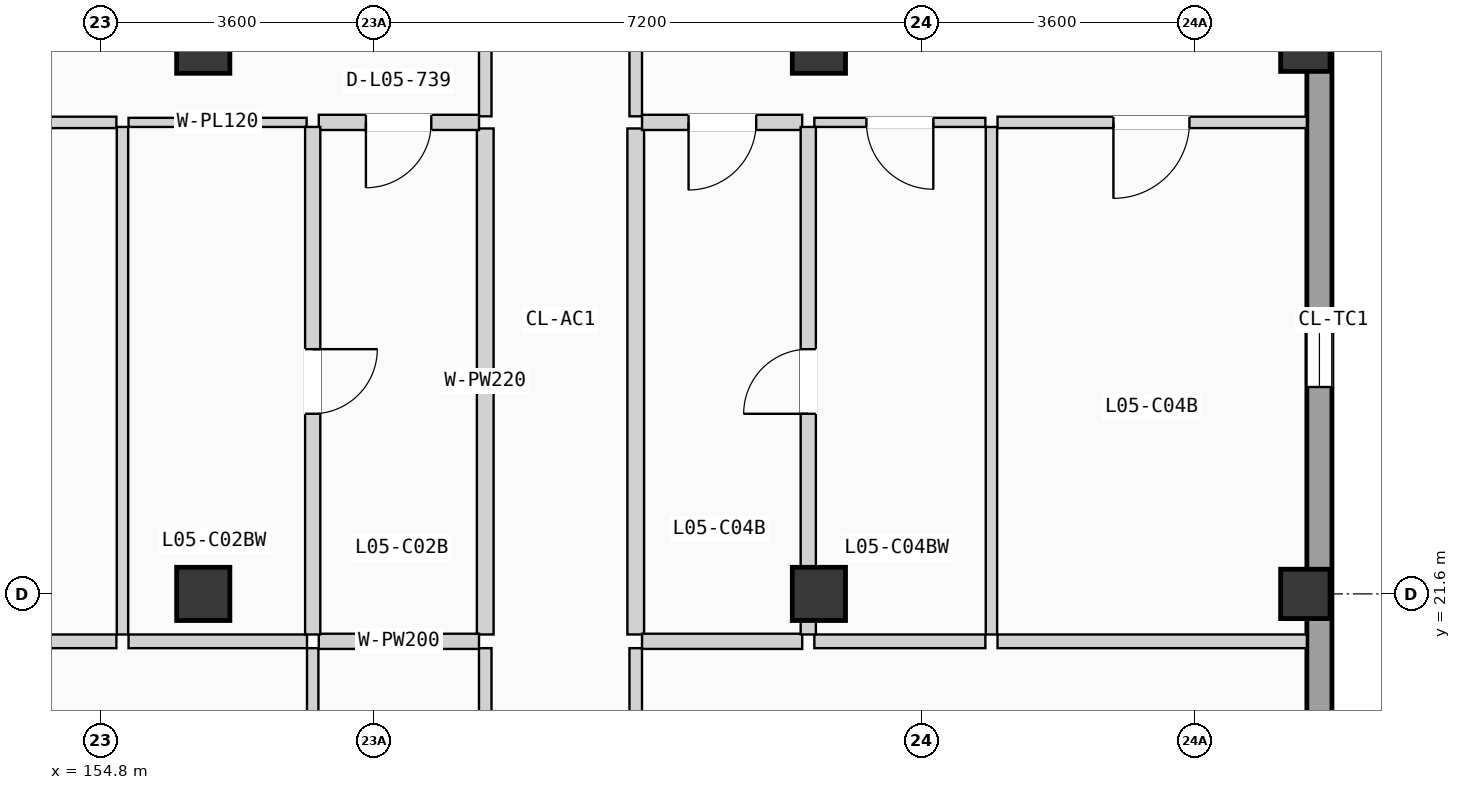
"""IFC4 building model, lengths in metres.
Left out: names, types, materials, properties, quantities, classifications, styles, units other than length and angle.
Written with IfcOpenShell. Run it as: python <this file> out.ifc"""

import sys

from ifc_helpers import new_model, si_unit, direction, frame, frame_2d, origin, origin_2d, place, context, subcontext, project, spatial, rectangle, extrude, element, fill, save


model = new_model("IFC4")
c1 = context("Model", 3, precision=1e-05, world=origin(), true_north=direction((0.0, 1.0)))
c2 = subcontext(c1, "Body", "Model", "MODEL_VIEW")
j1 = project(units=[si_unit("LENGTHUNIT", "METRE"), si_unit("PLANEANGLEUNIT", "RADIAN")], contexts=[c1])
p1 = place(None, origin())
s1 = spatial("IfcSite", under=j1, at=p1, CompositionType="ELEMENT")
p2 = place(p1, origin())
s2 = spatial("IfcBuilding", under=s1, at=p2, CompositionType="ELEMENT")
p3 = place(p2, frame((0.0, 0.0, 18.375)))
s3 = spatial("IfcBuildingStorey", under=s2, at=p3, CompositionType="ELEMENT", Elevation=18.375)
for number, where, z_axis, x_axis in (
    (1, (156.15, 21.6, 0.0), (0.0, 0.0, 1.0), (1.0, 0.0, 0.0)),
    (2, (156.15, 28.8, 0.0), (0.0, 0.0, 1.0), (1.0, 0.0, 0.0)),
    (3, (164.25, 21.6, 0.0), (0.0, 0.0, 1.0), (1.0, 0.0, 0.0)),
    (4, (164.25, 28.8, 0.0), (0.0, 0.0, 1.0), (1.0, 0.0, 0.0)),
):
    element("IfcColumn", number, at=place(p3, frame(where, z_axis=z_axis, x_axis=x_axis)), inside=s3, PredefinedType="COLUMN", context=c2, shape_type="SweptSolid", body=[
        extrude(rectangle(XDim=0.7, YDim=0.7, at=origin_2d()), origin(), (0.0, 0.0, 1.0), 3.15),
    ])
for number, where, z_axis, x_axis in (
    (5, (170.65, 21.6, 0.0), (0.0, 0.0, 1.0), (1.0, 0.0, 0.0)),
    (6, (170.65, 28.8, 0.0), (0.0, 0.0, 1.0), (1.0, 0.0, 0.0)),
):
    element("IfcColumn", number, at=place(p3, frame(where, z_axis=z_axis, x_axis=x_axis)), inside=s3, PredefinedType="COLUMN", context=c2, shape_type="SweptSolid", body=[
        extrude(rectangle(XDim=0.65, YDim=0.65, at=origin_2d()), origin(), (0.0, 0.0, 1.0), 3.15),
    ])
p4 = place(p3, frame((170.835, 0.33, 0.0), z_axis=(0.0, 0.0, 1.0), x_axis=(0.0, 1.0, 0.0)))
e7 = element("IfcWall", 7, at=p4, inside=s3, PredefinedType="SOLIDWALL", context=c2, shape_type="SweptSolid", body=[
    extrude(rectangle(XDim=49.74, YDim=0.33, at=frame_2d((24.87, 0.0))), origin(), (0.0, 0.0, 1.0), 2.89),
])
p5 = place(p4, frame((9.91, 0.0, 0.855)))
e8 = element("IfcOpeningElement", 8, at=p5, cuts=e7, PredefinedType="OPENING", context=c2, shape_type="SweptSolid", body=[
    extrude(rectangle(XDim=1.25, YDim=1.35, at=frame_2d((0.625, 0.675))), frame((0.0, 0.175, 0.0), z_axis=(0.0, -1.0, 0.0), x_axis=(1.0, 0.0, 0.0)), (0.0, 0.0, 1.0), 0.35),
])
p6 = place(p4, frame((16.823, 0.0, 0.705)))
e9 = element("IfcOpeningElement", 9, at=p6, cuts=e7, PredefinedType="OPENING", context=c2, shape_type="SweptSolid", body=[
    extrude(rectangle(XDim=1.25, YDim=1.5, at=frame_2d((0.625, 0.75))), frame((0.0, 0.175, 0.0), z_axis=(0.0, -1.0, 0.0), x_axis=(1.0, 0.0, 0.0)), (0.0, 0.0, 1.0), 0.35),
])
p7 = place(p4, frame((31.065, 0.0, 0.555)))
e10 = element("IfcOpeningElement", 10, at=p7, cuts=e7, PredefinedType="OPENING", context=c2, shape_type="SweptSolid", body=[
    extrude(rectangle(XDim=1.25, YDim=1.65, at=frame_2d((0.625, 0.825))), frame((0.0, 0.175, 0.0), z_axis=(0.0, -1.0, 0.0), x_axis=(1.0, 0.0, 0.0)), (0.0, 0.0, 1.0), 0.35),
])
p8 = place(p4, frame((23.992, 0.0, 0.85)))
e11 = element("IfcOpeningElement", 11, at=p8, cuts=e7, PredefinedType="OPENING", context=c2, shape_type="SweptSolid", body=[
    extrude(rectangle(XDim=0.95, YDim=1.2, at=frame_2d((0.475, 0.6))), frame((0.0, 0.175, 0.0), z_axis=(0.0, -1.0, 0.0), x_axis=(1.0, 0.0, 0.0)), (0.0, 0.0, 1.0), 0.35),
])
p9 = place(p4, frame((38.53, 0.0, 0.9)))
e12 = element("IfcOpeningElement", 12, at=p9, cuts=e7, PredefinedType="OPENING", context=c2, shape_type="SweptSolid", body=[
    extrude(rectangle(XDim=1.35, YDim=1.2, at=frame_2d((0.675, 0.6))), frame((0.0, 0.175, 0.0), z_axis=(0.0, -1.0, 0.0), x_axis=(1.0, 0.0, 0.0)), (0.0, 0.0, 1.0), 0.35),
])
p10 = place(p3, frame((159.86, 16.847, 0.0), z_axis=(0.0, 0.0, 1.0), x_axis=(0.0, 1.0, 0.0)))
e13 = element("IfcWall", 13, at=p10, inside=s3, PredefinedType="PARTITIONING", context=c2, shape_type="SweptSolid", body=[
    extrude(rectangle(XDim=4.039, YDim=0.165, at=frame_2d((2.02, 0.0))), origin(), (0.0, 0.0, 1.0), 2.87),
])
p11 = place(p3, frame((159.86, 27.884, 0.0), z_axis=(0.0, 0.0, 1.0), x_axis=(0.0, 1.0, 0.0)))
e14 = element("IfcWall", 14, at=p11, inside=s3, PredefinedType="PARTITIONING", context=c2, shape_type="SweptSolid", body=[
    extrude(rectangle(XDim=7.086, YDim=0.165, at=frame_2d((3.543, 0.0))), origin(), (0.0, 0.0, 1.0), 2.87),
])
p12 = place(p11, frame((3.038, 0.0, 0.0)))
e15 = element("IfcOpeningElement", 15, at=p12, cuts=e14, PredefinedType="OPENING", context=c2, shape_type="SweptSolid", body=[
    extrude(rectangle(XDim=1.01, YDim=2.11, at=frame_2d((0.505, 1.055))), frame((0.0, 0.093, 0.0), z_axis=(0.0, -1.0, 0.0), x_axis=(1.0, 0.0, 0.0)), (0.0, 0.0, 1.0), 0.185),
])
p13 = place(p3, frame((159.86, 21.066, 0.0), z_axis=(0.0, 0.0, 1.0), x_axis=(0.0, 1.0, 0.0)))
e16 = element("IfcWall", 16, at=p13, inside=s3, PredefinedType="PLUMBINGWALL", context=c2, shape_type="SweptSolid", body=[
    extrude(rectangle(XDim=6.658, YDim=0.22, at=frame_2d((3.329, 0.0))), origin(), (0.0, 0.0, 1.0), 2.87),
])
p14 = place(p3, frame((161.84, 14.333, 0.0), z_axis=(0.0, 0.0, 1.0), x_axis=(0.0, 1.0, 0.0)))
e17 = element("IfcWall", 17, at=p14, inside=s3, PredefinedType="PARTITIONING", context=c2, shape_type="SweptSolid", body=[
    extrude(rectangle(XDim=6.553, YDim=0.165, at=frame_2d((3.276, 0.0))), origin(), (0.0, 0.0, 1.0), 2.87),
])
p15 = place(p14, frame((2.787, 0.0, 0.0)))
e18 = element("IfcOpeningElement", 18, at=p15, cuts=e17, PredefinedType="OPENING", context=c2, shape_type="SweptSolid", body=[
    extrude(rectangle(XDim=0.98, YDim=2.08, at=frame_2d((0.49, 1.04))), frame((0.0, 0.093, 0.0), z_axis=(0.0, -1.0, 0.0), x_axis=(1.0, 0.0, 0.0)), (0.0, 0.0, 1.0), 0.185),
])
p16 = place(p3, frame((161.84, 27.884, 0.0), z_axis=(0.0, 0.0, 1.0), x_axis=(0.0, 1.0, 0.0)))
e19 = element("IfcWall", 19, at=p16, inside=s3, PredefinedType="PARTITIONING", context=c2, shape_type="SweptSolid", body=[
    extrude(rectangle(XDim=7.086, YDim=0.165, at=frame_2d((3.543, 0.0))), origin(), (0.0, 0.0, 1.0), 2.87),
])
p17 = place(p16, frame((3.038, 0.0, 0.0)))
e20 = element("IfcOpeningElement", 20, at=p17, cuts=e19, PredefinedType="OPENING", context=c2, shape_type="SweptSolid", body=[
    extrude(rectangle(XDim=1.01, YDim=2.11, at=frame_2d((0.505, 1.055))), frame((0.0, 0.093, 0.0), z_axis=(0.0, -1.0, 0.0), x_axis=(1.0, 0.0, 0.0)), (0.0, 0.0, 1.0), 0.185),
])
p18 = place(p3, frame((161.84, 21.066, 0.0), z_axis=(0.0, 0.0, 1.0), x_axis=(0.0, 1.0, 0.0)))
e21 = element("IfcWall", 21, at=p18, inside=s3, PredefinedType="PLUMBINGWALL", context=c2, shape_type="SweptSolid", body=[
    extrude(rectangle(XDim=6.658, YDim=0.22, at=frame_2d((3.329, 0.0))), origin(), (0.0, 0.0, 1.0), 2.87),
])
p19 = place(p3, frame((157.59, 16.842, 0.0), z_axis=(0.0, 0.0, 1.0), x_axis=(0.0, 1.0, 0.0)))
e22 = element("IfcWall", 22, at=p19, inside=s3, PredefinedType="PARTITIONING", context=c2, shape_type="SweptSolid", body=[
    extrude(rectangle(XDim=4.044, YDim=0.15, at=frame_2d((2.022, 0.0))), origin(), (0.0, 0.0, 1.0), 2.87),
])
p20 = place(p3, frame((157.67, 20.976, 0.0), z_axis=(0.0, 0.0, 1.0), x_axis=(1.0, 0.0, 0.0)))
e23 = element("IfcWall", 23, at=p20, inside=s3, PredefinedType="PLUMBINGWALL", context=c2, shape_type="SweptSolid", body=[
    extrude(rectangle(XDim=2.108, YDim=0.2, at=frame_2d((1.054, 0.0))), origin(), (0.0, 0.0, 1.0), 2.87),
])
p21 = place(p3, frame((149.73, 20.976, 0.0), z_axis=(0.0, 0.0, 1.0), x_axis=(1.0, 0.0, 0.0)))
e24 = element("IfcWall", 24, at=p21, inside=s3, PredefinedType="PARTITIONING", context=c2, shape_type="SweptSolid", body=[
    extrude(rectangle(XDim=5.277, YDim=0.18, at=frame_2d((2.639, 0.0))), origin(), (0.0, 0.0, 1.0), 2.87),
])
p22 = place(p3, frame((155.167, 20.976, 0.0), z_axis=(0.0, 0.0, 1.0), x_axis=(1.0, 0.0, 0.0)))
e25 = element("IfcWall", 25, at=p22, inside=s3, PredefinedType="PARTITIONING", context=c2, shape_type="SweptSolid", body=[
    extrude(rectangle(XDim=2.348, YDim=0.18, at=frame_2d((1.174, 0.0))), origin(), (0.0, 0.0, 1.0), 2.87),
])
p23 = place(p3, frame((157.67, 27.804, 0.0), z_axis=(0.0, 0.0, 1.0), x_axis=(1.0, 0.0, 0.0)))
e26 = element("IfcWall", 26, at=p23, inside=s3, PredefinedType="PLUMBINGWALL", context=c2, shape_type="SweptSolid", body=[
    extrude(rectangle(XDim=2.108, YDim=0.2, at=frame_2d((1.054, 0.0))), origin(), (0.0, 0.0, 1.0), 2.87),
])
p24 = place(p23, frame((0.62, 0.0, 0.0)))
e27 = element("IfcOpeningElement", 27, at=p24, cuts=e26, PredefinedType="OPENING", context=c2, shape_type="SweptSolid", body=[
    extrude(rectangle(XDim=0.86, YDim=2.0, at=frame_2d((0.43, 1.0))), frame((0.0, 0.11, 0.0), z_axis=(0.0, -1.0, 0.0), x_axis=(1.0, 0.0, 0.0)), (0.0, 0.0, 1.0), 0.22),
])
p25 = place(p3, frame((149.73, 27.804, 0.0), z_axis=(0.0, 0.0, 1.0), x_axis=(1.0, 0.0, 0.0)))
e28 = element("IfcWall", 28, at=p25, inside=s3, PredefinedType="PARTITIONING", context=c2, shape_type="SweptSolid", body=[
    extrude(rectangle(XDim=5.277, YDim=0.15, at=frame_2d((2.639, 0.0))), origin(), (0.0, 0.0, 1.0), 2.87),
])
p26 = place(p25, frame((2.109, 0.0, 0.0)))
e29 = element("IfcOpeningElement", 29, at=p26, cuts=e28, PredefinedType="OPENING", context=c2, shape_type="SweptSolid", body=[
    extrude(rectangle(XDim=1.08, YDim=2.1, at=frame_2d((0.54, 1.05))), frame((0.0, 0.085, 0.0), z_axis=(0.0, -1.0, 0.0), x_axis=(1.0, 0.0, 0.0)), (0.0, 0.0, 1.0), 0.17),
])
p27 = place(p3, frame((155.167, 27.804, 0.0), z_axis=(0.0, 0.0, 1.0), x_axis=(1.0, 0.0, 0.0)))
e30 = element("IfcWall", 30, at=p27, inside=s3, PredefinedType="PARTITIONING", context=c2, shape_type="SweptSolid", body=[
    extrude(rectangle(XDim=2.343, YDim=0.12, at=frame_2d((1.171, 0.0))), origin(), (0.0, 0.0, 1.0), 2.87),
])
p28 = place(p3, frame((157.59, 21.066, 0.0), z_axis=(0.0, 0.0, 1.0), x_axis=(0.0, 1.0, 0.0)))
e31 = element("IfcWall", 31, at=p28, inside=s3, PredefinedType="PLUMBINGWALL", context=c2, shape_type="SweptSolid", body=[
    extrude(rectangle(XDim=6.678, YDim=0.2, at=frame_2d((3.339, 0.0))), origin(), (0.0, 0.0, 1.0), 2.87),
])
p29 = place(p28, frame((2.904, 0.0, 0.0)))
e32 = element("IfcOpeningElement", 32, at=p29, cuts=e31, PredefinedType="OPENING", context=c2, shape_type="SweptSolid", body=[
    extrude(rectangle(XDim=0.85, YDim=2.01, at=frame_2d((0.425, 1.005))), frame((0.0, 0.11, 0.0), z_axis=(0.0, -1.0, 0.0), x_axis=(1.0, 0.0, 0.0)), (0.0, 0.0, 1.0), 0.22),
])
p30 = place(p3, frame((155.087, 21.066, 0.0), z_axis=(0.0, 0.0, 1.0), x_axis=(0.0, 1.0, 0.0)))
e33 = element("IfcWall", 33, at=p30, inside=s3, PredefinedType="PARTITIONING", context=c2, shape_type="SweptSolid", body=[
    extrude(rectangle(XDim=6.678, YDim=0.15, at=frame_2d((3.339, 0.0))), origin(), (0.0, 0.0, 1.0), 2.87),
])
p31 = place(p3, frame((161.923, 20.976, 0.0), z_axis=(0.0, 0.0, 1.0), x_axis=(1.0, 0.0, 0.0)))
e34 = element("IfcWall", 34, at=p31, inside=s3, PredefinedType="PLUMBINGWALL", context=c2, shape_type="SweptSolid", body=[
    extrude(rectangle(XDim=2.107, YDim=0.2, at=frame_2d((1.053, 0.0))), origin(), (0.0, 0.0, 1.0), 2.87),
])
p32 = place(p3, frame((166.6, 20.976, 0.0), z_axis=(0.0, 0.0, 1.0), x_axis=(1.0, 0.0, 0.0)))
e35 = element("IfcWall", 35, at=p32, inside=s3, PredefinedType="PARTITIONING", context=c2, shape_type="SweptSolid", body=[
    extrude(rectangle(XDim=4.07, YDim=0.18, at=frame_2d((2.035, 0.0))), origin(), (0.0, 0.0, 1.0), 2.87),
])
p33 = place(p3, frame((164.19, 20.976, 0.0), z_axis=(0.0, 0.0, 1.0), x_axis=(1.0, 0.0, 0.0)))
e36 = element("IfcWall", 36, at=p33, inside=s3, PredefinedType="PARTITIONING", context=c2, shape_type="SweptSolid", body=[
    extrude(rectangle(XDim=2.25, YDim=0.18, at=frame_2d((1.125, 0.0))), origin(), (0.0, 0.0, 1.0), 2.87),
])
p34 = place(p3, frame((161.923, 27.804, 0.0), z_axis=(0.0, 0.0, 1.0), x_axis=(1.0, 0.0, 0.0)))
e37 = element("IfcWall", 37, at=p34, inside=s3, PredefinedType="PLUMBINGWALL", context=c2, shape_type="SweptSolid", body=[
    extrude(rectangle(XDim=2.107, YDim=0.2, at=frame_2d((1.053, 0.0))), origin(), (0.0, 0.0, 1.0), 2.87),
])
p35 = place(p34, frame((0.612, 0.0, 0.0)))
e38 = element("IfcOpeningElement", 38, at=p35, cuts=e37, PredefinedType="OPENING", context=c2, shape_type="SweptSolid", body=[
    extrude(rectangle(XDim=0.89, YDim=2.03, at=frame_2d((0.445, 1.015))), frame((0.0, 0.11, 0.0), z_axis=(0.0, -1.0, 0.0), x_axis=(1.0, 0.0, 0.0)), (0.0, 0.0, 1.0), 0.22),
])
p36 = place(p3, frame((166.6, 27.804, 0.0), z_axis=(0.0, 0.0, 1.0), x_axis=(1.0, 0.0, 0.0)))
e39 = element("IfcWall", 39, at=p36, inside=s3, PredefinedType="PARTITIONING", context=c2, shape_type="SweptSolid", body=[
    extrude(rectangle(XDim=4.07, YDim=0.15, at=frame_2d((2.035, 0.0))), origin(), (0.0, 0.0, 1.0), 2.87),
])
p37 = place(p36, frame((1.525, 0.0, 0.0)))
e40 = element("IfcOpeningElement", 40, at=p37, cuts=e39, PredefinedType="OPENING", context=c2, shape_type="SweptSolid", body=[
    extrude(rectangle(XDim=1.0, YDim=2.06, at=frame_2d((0.5, 1.03))), frame((0.0, 0.085, 0.0), z_axis=(0.0, -1.0, 0.0), x_axis=(1.0, 0.0, 0.0)), (0.0, 0.0, 1.0), 0.17),
])
p38 = place(p3, frame((164.19, 27.804, 0.0), z_axis=(0.0, 0.0, 1.0), x_axis=(1.0, 0.0, 0.0)))
e41 = element("IfcWall", 41, at=p38, inside=s3, PredefinedType="PARTITIONING", context=c2, shape_type="SweptSolid", body=[
    extrude(rectangle(XDim=2.25, YDim=0.12, at=frame_2d((1.125, 0.0))), origin(), (0.0, 0.0, 1.0), 2.87),
])
p39 = place(p38, frame((0.685, 0.0, 0.0)))
e42 = element("IfcOpeningElement", 42, at=p39, cuts=e41, PredefinedType="OPENING", context=c2, shape_type="SweptSolid", body=[
    extrude(rectangle(XDim=0.88, YDim=2.02, at=frame_2d((0.44, 1.01))), frame((0.0, 0.07, 0.0), z_axis=(0.0, -1.0, 0.0), x_axis=(1.0, 0.0, 0.0)), (0.0, 0.0, 1.0), 0.14),
])
p40 = place(p3, frame((164.11, 21.066, 0.0), z_axis=(0.0, 0.0, 1.0), x_axis=(0.0, 1.0, 0.0)))
e43 = element("IfcWall", 43, at=p40, inside=s3, PredefinedType="PLUMBINGWALL", context=c2, shape_type="SweptSolid", body=[
    extrude(rectangle(XDim=6.678, YDim=0.2, at=frame_2d((3.339, 0.0))), origin(), (0.0, 0.0, 1.0), 2.87),
])
p41 = place(p40, frame((2.904, 0.0, 0.0)))
e44 = element("IfcOpeningElement", 44, at=p41, cuts=e43, PredefinedType="OPENING", context=c2, shape_type="SweptSolid", body=[
    extrude(rectangle(XDim=0.85, YDim=2.01, at=frame_2d((0.425, 1.005))), frame((0.0, 0.11, 0.0), z_axis=(0.0, -1.0, 0.0), x_axis=(1.0, 0.0, 0.0)), (0.0, 0.0, 1.0), 0.22),
])
p42 = place(p3, frame((166.52, 21.066, 0.0), z_axis=(0.0, 0.0, 1.0), x_axis=(0.0, 1.0, 0.0)))
e45 = element("IfcWall", 45, at=p42, inside=s3, PredefinedType="PARTITIONING", context=c2, shape_type="SweptSolid", body=[
    extrude(rectangle(XDim=6.678, YDim=0.15, at=frame_2d((3.339, 0.0))), origin(), (0.0, 0.0, 1.0), 2.87),
])
p43 = place(p8, origin())
e46 = element("IfcWindow", 46, at=p43, inside=s3, PartitioningType="SINGLE_PANEL", PredefinedType="WINDOW", context=c2, shape_type="SweptSolid", body=[
    extrude(rectangle(XDim=0.95, YDim=1.2, at=frame_2d((0.475, 0.6))), frame((0.0, 0.03, 0.0), z_axis=(0.0, -1.0, 0.0), x_axis=(1.0, 0.0, 0.0)), (0.0, 0.0, 1.0), 0.06),
])
fill(e11, e46)
p44 = place(p24, frame((0.86, 0.0, 0.0), z_axis=(0.0, 0.0, 1.0), x_axis=(-1.0, 0.0, 0.0)))
e47 = element("IfcDoor", 47, at=p44, inside=s3, OperationType="SINGLE_SWING_LEFT", PredefinedType="DOOR", context=c2, shape_type="SweptSolid", body=[
    extrude(rectangle(XDim=0.86, YDim=2.0, at=frame_2d((0.43, 1.0))), frame((0.0, 0.025, 0.0), z_axis=(0.0, -1.0, 0.0), x_axis=(1.0, 0.0, 0.0)), (0.0, 0.0, 1.0), 0.05),
])
fill(e27, e47)
p45 = place(p29, frame((0.85, 0.0, 0.0), z_axis=(0.0, 0.0, 1.0), x_axis=(-1.0, 0.0, 0.0)))
e48 = element("IfcDoor", 48, at=p45, inside=s3, OperationType="SINGLE_SWING_RIGHT", PredefinedType="DOOR", context=c2, shape_type="SweptSolid", body=[
    extrude(rectangle(XDim=0.85, YDim=2.01, at=frame_2d((0.425, 1.005))), frame((0.0, 0.025, 0.0), z_axis=(0.0, -1.0, 0.0), x_axis=(1.0, 0.0, 0.0)), (0.0, 0.0, 1.0), 0.05),
])
fill(e32, e48)
p46 = place(p35, frame((0.89, 0.0, 0.0), z_axis=(0.0, 0.0, 1.0), x_axis=(-1.0, 0.0, 0.0)))
e49 = element("IfcDoor", 49, at=p46, inside=s3, OperationType="SINGLE_SWING_LEFT", PredefinedType="DOOR", context=c2, shape_type="SweptSolid", body=[
    extrude(rectangle(XDim=0.89, YDim=2.03, at=frame_2d((0.445, 1.015))), frame((0.0, 0.025, 0.0), z_axis=(0.0, -1.0, 0.0), x_axis=(1.0, 0.0, 0.0)), (0.0, 0.0, 1.0), 0.05),
])
fill(e38, e49)
p47 = place(p37, frame((1.0, 0.0, 0.0), z_axis=(0.0, 0.0, 1.0), x_axis=(-1.0, 0.0, 0.0)))
e50 = element("IfcDoor", 50, at=p47, inside=s3, OperationType="SINGLE_SWING_LEFT", PredefinedType="DOOR", context=c2, shape_type="SweptSolid", body=[
    extrude(rectangle(XDim=1.0, YDim=2.06, at=frame_2d((0.5, 1.03))), frame((0.0, 0.025, 0.0), z_axis=(0.0, -1.0, 0.0), x_axis=(1.0, 0.0, 0.0)), (0.0, 0.0, 1.0), 0.05),
])
fill(e40, e50)
p48 = place(p39, frame((0.88, 0.0, 0.0), z_axis=(0.0, 0.0, 1.0), x_axis=(-1.0, 0.0, 0.0)))
e51 = element("IfcDoor", 51, at=p48, inside=s3, OperationType="SINGLE_SWING_RIGHT", PredefinedType="DOOR", context=c2, shape_type="SweptSolid", body=[
    extrude(rectangle(XDim=0.88, YDim=2.02, at=frame_2d((0.44, 1.01))), frame((0.0, 0.025, 0.0), z_axis=(0.0, -1.0, 0.0), x_axis=(1.0, 0.0, 0.0)), (0.0, 0.0, 1.0), 0.05),
])
fill(e42, e51)
p49 = place(p41, origin())
e52 = element("IfcDoor", 52, at=p49, inside=s3, OperationType="SINGLE_SWING_LEFT", PredefinedType="DOOR", context=c2, shape_type="SweptSolid", body=[
    extrude(rectangle(XDim=0.85, YDim=2.01, at=frame_2d((0.425, 1.005))), frame((0.0, 0.025, 0.0), z_axis=(0.0, -1.0, 0.0), x_axis=(1.0, 0.0, 0.0)), (0.0, 0.0, 1.0), 0.05),
])
fill(e44, e52)
save(model, sys.argv[1])
